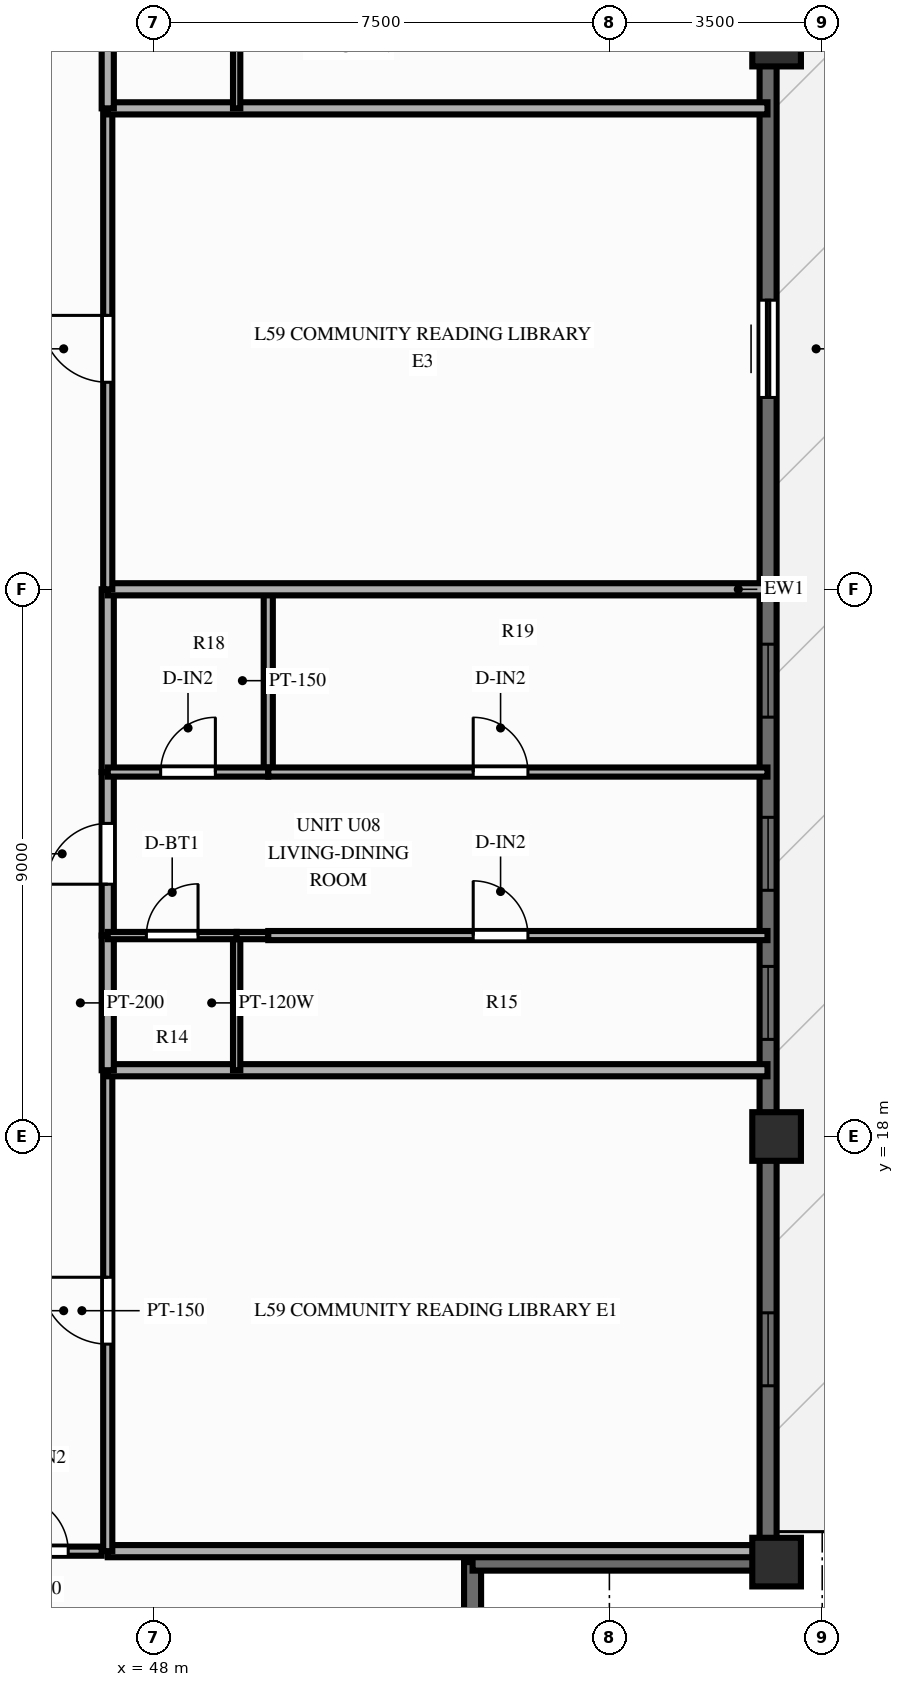
"""IFC4 building model, lengths in metres.
Left out: names, types, materials, properties, quantities, classifications, styles, units other than length and angle.
Written with IfcOpenShell. Run it as: python <this file> out.ifc"""

import sys

from ifc_helpers import new_model, si_unit, direction, frame, frame_2d, origin, origin_2d, place, context, subcontext, project, spatial, rectangle, extrude, source, transform, mapped, element, fill, save


model = new_model("IFC4")
c1 = context("Model", 3, precision=1e-05, world=origin(), true_north=direction((0.0, 1.0)))
c2 = subcontext(c1, "Body", "Model", "MODEL_VIEW")
j1 = project(units=[si_unit("LENGTHUNIT", "METRE"), si_unit("PLANEANGLEUNIT", "RADIAN")], contexts=[c1])
p1 = place(None, origin())
s1 = spatial("IfcSite", under=j1, at=p1, CompositionType="ELEMENT")
p2 = place(p1, origin())
s2 = spatial("IfcBuilding", under=s1, at=p2, CompositionType="ELEMENT")
p3 = place(p2, frame((0.0, 0.0, 189.7)))
s3 = spatial("IfcBuildingStorey", under=s2, at=p3, CompositionType="ELEMENT", Elevation=189.7)
m1 = source(origin(), c2, "Body", "SweptSolid", [
    extrude(rectangle(XDim=0.8, YDim=0.8, at=origin_2d()), origin(), (0.0, 0.0, 1.0), 3.0),
])
for number, where, z_axis, x_axis in (
    (1, (58.25, 11.0, 0.0), (0.0, 0.0, 1.0), (1.0, 0.0, 0.0)),
    (2, (58.25, 18.0, 0.0), (0.0, 0.0, 1.0), (1.0, 0.0, 0.0)),
    (3, (58.25, 36.0, 0.0), (0.0, 0.0, 1.0), (1.0, 0.0, 0.0)),
):
    element("IfcColumn", number, at=place(p3, frame(where, z_axis=z_axis, x_axis=x_axis)), inside=s3, PredefinedType="COLUMN", context=c2, shape_type="MappedRepresentation", body=[
        mapped(m1, transform((0.0, 0.0, 0.0), scale=1.0)),
    ])
p4 = place(p3, frame((58.11, 11.0, 0.0), z_axis=(0.0, 0.0, 1.0), x_axis=(0.0, 1.0, 0.0)))
e4 = element("IfcWall", 4, at=p4, inside=s3, PredefinedType="SOLIDWALL", context=c2, shape_type="SweptSolid", body=[
    extrude(rectangle(XDim=32.0, YDim=0.28, at=frame_2d((16.0, 0.0))), origin(), (0.0, 0.0, 1.0), 2.28),
])
p5 = place(p4, frame((2.9, 0.0, 0.25)))
e5 = element("IfcOpeningElement", 5, at=p5, cuts=e4, PredefinedType="OPENING", context=c2, shape_type="SweptSolid", body=[
    extrude(rectangle(XDim=1.2, YDim=1.5, at=frame_2d((0.6, 0.75))), frame((0.0, 0.152, 0.0), z_axis=(0.0, -1.0, 0.0), x_axis=(1.0, 0.0, 0.0)), (0.0, 0.0, 1.0), 0.304),
])
p6 = place(p4, frame((8.597, 0.0, 0.25)))
e6 = element("IfcOpeningElement", 6, at=p6, cuts=e4, PredefinedType="OPENING", context=c2, shape_type="SweptSolid", body=[
    extrude(rectangle(XDim=1.2, YDim=1.5, at=frame_2d((0.6, 0.75))), frame((0.0, 0.152, 0.0), z_axis=(0.0, -1.0, 0.0), x_axis=(1.0, 0.0, 0.0)), (0.0, 0.0, 1.0), 0.304),
])
p7 = place(p4, frame((11.05, 0.0, 0.25)))
e7 = element("IfcOpeningElement", 7, at=p7, cuts=e4, PredefinedType="OPENING", context=c2, shape_type="SweptSolid", body=[
    extrude(rectangle(XDim=1.2, YDim=1.5, at=frame_2d((0.6, 0.75))), frame((0.0, 0.152, 0.0), z_axis=(0.0, -1.0, 0.0), x_axis=(1.0, 0.0, 0.0)), (0.0, 0.0, 1.0), 0.304),
])
p8 = place(p4, frame((13.897, 0.0, 0.25)))
e8 = element("IfcOpeningElement", 8, at=p8, cuts=e4, PredefinedType="OPENING", context=c2, shape_type="SweptSolid", body=[
    extrude(rectangle(XDim=1.2, YDim=1.5, at=frame_2d((0.6, 0.75))), frame((0.0, 0.152, 0.0), z_axis=(0.0, -1.0, 0.0), x_axis=(1.0, 0.0, 0.0)), (0.0, 0.0, 1.0), 0.304),
])
p9 = place(p4, frame((20.755, 0.0, 0.0), z_axis=(0.0, 0.0, 1.0), x_axis=(-1.0, 0.0, 0.0)))
e9 = element("IfcOpeningElement", 9, at=p9, cuts=e4, PredefinedType="OPENING", context=c2, shape_type="SweptSolid", body=[
    extrude(rectangle(XDim=1.6, YDim=2.15, at=frame_2d((0.8, 1.075))), frame((0.0, 0.152, 0.0), z_axis=(0.0, -1.0, 0.0), x_axis=(1.0, 0.0, 0.0)), (0.0, 0.0, 1.0), 0.304),
])
p10 = place(p4, frame((26.967, 0.0, 0.25)))
e10 = element("IfcOpeningElement", 10, at=p10, cuts=e4, PredefinedType="OPENING", context=c2, shape_type="SweptSolid", body=[
    extrude(rectangle(XDim=1.2, YDim=1.5, at=frame_2d((0.6, 0.75))), frame((0.0, 0.152, 0.0), z_axis=(0.0, -1.0, 0.0), x_axis=(1.0, 0.0, 0.0)), (0.0, 0.0, 1.0), 0.304),
])
p11 = place(p4, frame((29.687, 0.0, 0.25)))
e11 = element("IfcOpeningElement", 11, at=p11, cuts=e4, PredefinedType="OPENING", context=c2, shape_type="SweptSolid", body=[
    extrude(rectangle(XDim=1.2, YDim=1.5, at=frame_2d((0.6, 0.75))), frame((0.0, 0.152, 0.0), z_axis=(0.0, -1.0, 0.0), x_axis=(1.0, 0.0, 0.0)), (0.0, 0.0, 1.0), 0.304),
])
for number, where, z_axis, x_axis in (
    (12, (53.25, 6.08, 0.0), (0.0, 0.0, 1.0), (0.0, 1.0, 0.0)),
    (13, (53.25, 11.0, 0.0), (0.0, 0.0, 1.0), (1.0, 0.0, 0.0)),
):
    element("IfcWall", number, at=place(p3, frame(where, z_axis=z_axis, x_axis=x_axis)), inside=s3, PredefinedType="SOLIDWALL", context=c2, shape_type="SweptSolid", body=[
        extrude(rectangle(XDim=4.92, YDim=0.28, at=frame_2d((2.46, 0.0))), origin(), (0.0, 0.0, 1.0), 2.28),
    ])
p12 = place(p3, frame((44.82, 11.18, 0.0), z_axis=(0.0, 0.0, 1.0), x_axis=(1.0, 0.0, 0.0)))
e14 = element("IfcWall", 14, at=p12, inside=s3, PredefinedType="PARTITIONING", context=c2, shape_type="SweptSolid", body=[
    extrude(rectangle(XDim=2.33, YDim=0.15, at=frame_2d((1.165, 0.0))), origin(), (0.0, 0.0, 1.0), 2.79),
])
p13 = place(p12, frame((0.88, 0.0, 0.0)))
e15 = element("IfcOpeningElement", 15, at=p13, cuts=e14, PredefinedType="OPENING", context=c2, shape_type="SweptSolid", body=[
    extrude(rectangle(XDim=0.9, YDim=2.1, at=frame_2d((0.45, 1.05))), frame((0.0, 0.087, 0.0), z_axis=(0.0, -1.0, 0.0), x_axis=(1.0, 0.0, 0.0)), (0.0, 0.0, 1.0), 0.174),
])
p14 = place(p3, frame((47.25, 11.18, 0.0), z_axis=(0.0, 0.0, 1.0), x_axis=(1.0, 0.0, 0.0)))
e16 = element("IfcWall", 16, at=p14, inside=s3, PredefinedType="PARTITIONING", context=c2, shape_type="SweptSolid", body=[
    extrude(rectangle(XDim=10.85, YDim=0.2, at=frame_2d((5.425, 0.0))), origin(), (0.0, 0.0, 1.0), 2.79),
])
p15 = place(p3, frame((47.25, 11.18, 0.0), z_axis=(0.0, 0.0, 1.0), x_axis=(0.0, 1.0, 0.0)))
e17 = element("IfcWall", 17, at=p15, inside=s3, PredefinedType="PARTITIONING", context=c2, shape_type="SweptSolid", body=[
    extrude(rectangle(XDim=7.91, YDim=0.15, at=frame_2d((3.955, 0.0))), origin(), (0.0, 0.0, 1.0), 2.79),
])
p16 = place(p15, frame((3.405, 0.0, 0.0)))
e18 = element("IfcOpeningElement", 18, at=p16, cuts=e17, PredefinedType="OPENING", context=c2, shape_type="SweptSolid", body=[
    extrude(rectangle(XDim=1.1, YDim=2.15, at=frame_2d((0.55, 1.075))), frame((0.0, 0.087, 0.0), z_axis=(0.0, -1.0, 0.0), x_axis=(1.0, 0.0, 0.0)), (0.0, 0.0, 1.0), 0.174),
])
p17 = place(p3, frame((47.25, 19.09, 0.0), z_axis=(0.0, 0.0, 1.0), x_axis=(1.0, 0.0, 0.0)))
e19 = element("IfcWall", 19, at=p17, inside=s3, PredefinedType="PARTITIONING", context=c2, shape_type="SweptSolid", body=[
    extrude(rectangle(XDim=10.85, YDim=0.2, at=frame_2d((5.425, 0.0))), origin(), (0.0, 0.0, 1.0), 2.79),
])
p18 = place(p3, frame((47.25, 19.09, 0.0), z_axis=(0.0, 0.0, 1.0), x_axis=(0.0, 1.0, 0.0)))
e20 = element("IfcWall", 20, at=p18, inside=s3, PredefinedType="PARTITIONING", context=c2, shape_type="SweptSolid", body=[
    extrude(rectangle(XDim=2.215, YDim=0.2, at=frame_2d((1.107, 0.0))), origin(), (0.0, 0.0, 1.0), 2.79),
])
p19 = place(p3, frame((47.25, 21.305, 0.0), z_axis=(0.0, 0.0, 1.0), x_axis=(0.0, 1.0, 0.0)))
e21 = element("IfcWall", 21, at=p19, inside=s3, PredefinedType="PARTITIONING", context=c2, shape_type="SweptSolid", body=[
    extrude(rectangle(XDim=2.689, YDim=0.2, at=frame_2d((1.345, 0.0))), origin(), (0.0, 0.0, 1.0), 2.79),
])
p20 = place(p19, frame((0.845, 0.0, 0.0)))
e22 = element("IfcOpeningElement", 22, at=p20, cuts=e21, PredefinedType="OPENING", context=c2, shape_type="SweptSolid", body=[
    extrude(rectangle(XDim=1.0, YDim=2.15, at=frame_2d((0.5, 1.075))), frame((0.0, 0.112, 0.0), z_axis=(0.0, -1.0, 0.0), x_axis=(1.0, 0.0, 0.0)), (0.0, 0.0, 1.0), 0.224),
])
p21 = place(p3, frame((47.25, 23.994, 0.0), z_axis=(0.0, 0.0, 1.0), x_axis=(0.0, 1.0, 0.0)))
e23 = element("IfcWall", 23, at=p21, inside=s3, PredefinedType="PARTITIONING", context=c2, shape_type="SweptSolid", body=[
    extrude(rectangle(XDim=3.006, YDim=0.2, at=frame_2d((1.503, 0.0))), origin(), (0.0, 0.0, 1.0), 2.79),
])
p22 = place(p3, frame((49.37, 19.09, 0.0), z_axis=(0.0, 0.0, 1.0), x_axis=(0.0, 1.0, 0.0)))
e24 = element("IfcWall", 24, at=p22, inside=s3, PredefinedType="PARTITIONING", context=c2, shape_type="SweptSolid", body=[
    extrude(rectangle(XDim=2.215, YDim=0.12, at=frame_2d((1.107, 0.0))), origin(), (0.0, 0.0, 1.0), 2.79),
])
p23 = place(p3, frame((49.89, 23.994, 0.0), z_axis=(0.0, 0.0, 1.0), x_axis=(0.0, 1.0, 0.0)))
e25 = element("IfcWall", 25, at=p23, inside=s3, PredefinedType="PARTITIONING", context=c2, shape_type="SweptSolid", body=[
    extrude(rectangle(XDim=3.006, YDim=0.15, at=frame_2d((1.503, 0.0))), origin(), (0.0, 0.0, 1.0), 2.79),
])
p24 = place(p3, frame((47.25, 21.305, 0.0), z_axis=(0.0, 0.0, 1.0), x_axis=(1.0, 0.0, 0.0)))
e26 = element("IfcWall", 26, at=p24, inside=s3, PredefinedType="PARTITIONING", context=c2, shape_type="SweptSolid", body=[
    extrude(rectangle(XDim=2.12, YDim=0.12, at=frame_2d((1.06, 0.0))), origin(), (0.0, 0.0, 1.0), 2.79),
])
p25 = place(p24, frame((0.635, 0.0, 0.0)))
e27 = element("IfcOpeningElement", 27, at=p25, cuts=e26, PredefinedType="OPENING", context=c2, shape_type="SweptSolid", body=[
    extrude(rectangle(XDim=0.85, YDim=2.05, at=frame_2d((0.425, 1.025))), frame((0.0, 0.072, 0.0), z_axis=(0.0, -1.0, 0.0), x_axis=(1.0, 0.0, 0.0)), (0.0, 0.0, 1.0), 0.144),
])
p26 = place(p3, frame((49.37, 21.305, 0.0), z_axis=(0.0, 0.0, 1.0), x_axis=(1.0, 0.0, 0.0)))
e28 = element("IfcWall", 28, at=p26, inside=s3, PredefinedType="PARTITIONING", context=c2, shape_type="SweptSolid", body=[
    extrude(rectangle(XDim=0.52, YDim=0.12, at=frame_2d((0.26, 0.0))), origin(), (0.0, 0.0, 1.0), 2.79),
])
p27 = place(p3, frame((49.89, 21.305, 0.0), z_axis=(0.0, 0.0, 1.0), x_axis=(1.0, 0.0, 0.0)))
e29 = element("IfcWall", 29, at=p27, inside=s3, PredefinedType="PARTITIONING", context=c2, shape_type="SweptSolid", body=[
    extrude(rectangle(XDim=8.21, YDim=0.15, at=frame_2d((4.105, 0.0))), origin(), (0.0, 0.0, 1.0), 2.79),
])
p28 = place(p27, frame((3.37, 0.0, 0.0)))
e30 = element("IfcOpeningElement", 30, at=p28, cuts=e29, PredefinedType="OPENING", context=c2, shape_type="SweptSolid", body=[
    extrude(rectangle(XDim=0.9, YDim=2.1, at=frame_2d((0.45, 1.05))), frame((0.0, 0.087, 0.0), z_axis=(0.0, -1.0, 0.0), x_axis=(1.0, 0.0, 0.0)), (0.0, 0.0, 1.0), 0.174),
])
p29 = place(p3, frame((47.25, 23.994, 0.0), z_axis=(0.0, 0.0, 1.0), x_axis=(1.0, 0.0, 0.0)))
e31 = element("IfcWall", 31, at=p29, inside=s3, PredefinedType="PARTITIONING", context=c2, shape_type="SweptSolid", body=[
    extrude(rectangle(XDim=2.64, YDim=0.15, at=frame_2d((1.32, 0.0))), origin(), (0.0, 0.0, 1.0), 2.79),
])
p30 = place(p29, frame((0.87, 0.0, 0.0)))
e32 = element("IfcOpeningElement", 32, at=p30, cuts=e31, PredefinedType="OPENING", context=c2, shape_type="SweptSolid", body=[
    extrude(rectangle(XDim=0.9, YDim=2.1, at=frame_2d((0.45, 1.05))), frame((0.0, 0.087, 0.0), z_axis=(0.0, -1.0, 0.0), x_axis=(1.0, 0.0, 0.0)), (0.0, 0.0, 1.0), 0.174),
])
p31 = place(p3, frame((49.89, 23.994, 0.0), z_axis=(0.0, 0.0, 1.0), x_axis=(1.0, 0.0, 0.0)))
e33 = element("IfcWall", 33, at=p31, inside=s3, PredefinedType="PARTITIONING", context=c2, shape_type="SweptSolid", body=[
    extrude(rectangle(XDim=8.21, YDim=0.15, at=frame_2d((4.105, 0.0))), origin(), (0.0, 0.0, 1.0), 2.79),
])
p32 = place(p31, frame((3.37, 0.0, 0.0)))
e34 = element("IfcOpeningElement", 34, at=p32, cuts=e33, PredefinedType="OPENING", context=c2, shape_type="SweptSolid", body=[
    extrude(rectangle(XDim=0.9, YDim=2.1, at=frame_2d((0.45, 1.05))), frame((0.0, 0.087, 0.0), z_axis=(0.0, -1.0, 0.0), x_axis=(1.0, 0.0, 0.0)), (0.0, 0.0, 1.0), 0.174),
])
p33 = place(p3, frame((47.25, 27.0, 0.0), z_axis=(0.0, 0.0, 1.0), x_axis=(1.0, 0.0, 0.0)))
e35 = element("IfcWall", 35, at=p33, inside=s3, PredefinedType="PARTITIONING", context=c2, shape_type="SweptSolid", body=[
    extrude(rectangle(XDim=10.85, YDim=0.2, at=frame_2d((5.425, 0.0))), origin(), (0.0, 0.0, 1.0), 2.79),
])
p34 = place(p3, frame((47.25, 27.0, 0.0), z_axis=(0.0, 0.0, 1.0), x_axis=(0.0, 1.0, 0.0)))
e36 = element("IfcWall", 36, at=p34, inside=s3, PredefinedType="PARTITIONING", context=c2, shape_type="SweptSolid", body=[
    extrude(rectangle(XDim=7.91, YDim=0.15, at=frame_2d((3.955, 0.0))), origin(), (0.0, 0.0, 1.0), 2.79),
])
p35 = place(p34, frame((3.405, 0.0, 0.0)))
e37 = element("IfcOpeningElement", 37, at=p35, cuts=e36, PredefinedType="OPENING", context=c2, shape_type="SweptSolid", body=[
    extrude(rectangle(XDim=1.1, YDim=2.15, at=frame_2d((0.55, 1.075))), frame((0.0, 0.087, 0.0), z_axis=(0.0, -1.0, 0.0), x_axis=(1.0, 0.0, 0.0)), (0.0, 0.0, 1.0), 0.174),
])
p36 = place(p3, frame((47.25, 34.91, 0.0), z_axis=(0.0, 0.0, 1.0), x_axis=(1.0, 0.0, 0.0)))
e38 = element("IfcWall", 38, at=p36, inside=s3, PredefinedType="PARTITIONING", context=c2, shape_type="SweptSolid", body=[
    extrude(rectangle(XDim=10.85, YDim=0.2, at=frame_2d((5.425, 0.0))), origin(), (0.0, 0.0, 1.0), 2.79),
])
p37 = place(p3, frame((47.25, 34.91, 0.0), z_axis=(0.0, 0.0, 1.0), x_axis=(0.0, 1.0, 0.0)))
e39 = element("IfcWall", 39, at=p37, inside=s3, PredefinedType="PARTITIONING", context=c2, shape_type="SweptSolid", body=[
    extrude(rectangle(XDim=2.41, YDim=0.2, at=frame_2d((1.205, 0.0))), origin(), (0.0, 0.0, 1.0), 2.79),
])
p38 = place(p3, frame((49.37, 34.91, 0.0), z_axis=(0.0, 0.0, 1.0), x_axis=(0.0, 1.0, 0.0)))
e40 = element("IfcWall", 40, at=p38, inside=s3, PredefinedType="PARTITIONING", context=c2, shape_type="SweptSolid", body=[
    extrude(rectangle(XDim=2.41, YDim=0.12, at=frame_2d((1.205, 0.0))), origin(), (0.0, 0.0, 1.0), 2.79),
])
m2 = source(origin(), c2, "Body", "SweptSolid", [
    extrude(rectangle(XDim=1.2, YDim=1.5, at=frame_2d((0.6, 0.75))), frame((0.0, 0.03, 0.0), z_axis=(0.0, -1.0, 0.0), x_axis=(1.0, 0.0, 0.0)), (0.0, 0.0, 1.0), 0.06),
])
p39 = place(p5, origin())
e41 = element("IfcWindow", 41, at=p39, inside=s3, PartitioningType="SINGLE_PANEL", PredefinedType="WINDOW", context=c2, shape_type="MappedRepresentation", body=[
    mapped(m2, transform((0.0, 0.0, 0.0), scale=1.0)),
])
fill(e5, e41)
p40 = place(p6, origin())
e42 = element("IfcWindow", 42, at=p40, inside=s3, PartitioningType="SINGLE_PANEL", PredefinedType="WINDOW", context=c2, shape_type="MappedRepresentation", body=[
    mapped(m2, transform((0.0, 0.0, 0.0), scale=1.0)),
])
fill(e6, e42)
p41 = place(p7, origin())
e43 = element("IfcWindow", 43, at=p41, inside=s3, PartitioningType="SINGLE_PANEL", PredefinedType="WINDOW", context=c2, shape_type="MappedRepresentation", body=[
    mapped(m2, transform((0.0, 0.0, 0.0), scale=1.0)),
])
fill(e7, e43)
p42 = place(p8, origin())
e44 = element("IfcWindow", 44, at=p42, inside=s3, PartitioningType="SINGLE_PANEL", PredefinedType="WINDOW", context=c2, shape_type="MappedRepresentation", body=[
    mapped(m2, transform((0.0, 0.0, 0.0), scale=1.0)),
])
fill(e8, e44)
m3 = source(origin(), c2, "Body", "SweptSolid", [
    extrude(rectangle(XDim=1.6, YDim=2.15, at=frame_2d((0.8, 1.075))), frame((0.0, 0.025, 0.0), z_axis=(0.0, -1.0, 0.0), x_axis=(1.0, 0.0, 0.0)), (0.0, 0.0, 1.0), 0.05),
])
p43 = place(p9, origin())
e45 = element("IfcDoor", 45, at=p43, inside=s3, OperationType="SLIDING_TO_LEFT", PredefinedType="DOOR", context=c2, shape_type="MappedRepresentation", body=[
    mapped(m3, transform((0.0, 0.0, 0.0), scale=1.0)),
])
fill(e9, e45)
m4 = source(origin(), c2, "Body", "SweptSolid", [
    extrude(rectangle(XDim=0.9, YDim=2.1, at=frame_2d((0.45, 1.05))), frame((0.0, 0.025, 0.0), z_axis=(0.0, -1.0, 0.0), x_axis=(1.0, 0.0, 0.0)), (0.0, 0.0, 1.0), 0.05),
])
p44 = place(p13, origin())
e46 = element("IfcDoor", 46, at=p44, inside=s3, OperationType="SINGLE_SWING_LEFT", PredefinedType="DOOR", context=c2, shape_type="MappedRepresentation", body=[
    mapped(m4, transform((0.0, 0.0, 0.0), scale=1.0)),
])
fill(e15, e46)
m5 = source(origin(), c2, "Body", "SweptSolid", [
    extrude(rectangle(XDim=1.1, YDim=2.15, at=frame_2d((0.55, 1.075))), frame((0.0, 0.025, 0.0), z_axis=(0.0, -1.0, 0.0), x_axis=(1.0, 0.0, 0.0)), (0.0, 0.0, 1.0), 0.05),
])
p45 = place(p16, origin())
e47 = element("IfcDoor", 47, at=p45, inside=s3, OperationType="SINGLE_SWING_RIGHT", PredefinedType="DOOR", context=c2, shape_type="MappedRepresentation", body=[
    mapped(m5, transform((0.0, 0.0, 0.0), scale=1.0)),
])
fill(e18, e47)
m6 = source(origin(), c2, "Body", "SweptSolid", [
    extrude(rectangle(XDim=1.0, YDim=2.15, at=frame_2d((0.5, 1.075))), frame((0.0, 0.025, 0.0), z_axis=(0.0, -1.0, 0.0), x_axis=(1.0, 0.0, 0.0)), (0.0, 0.0, 1.0), 0.05),
])
p46 = place(p20, origin())
e48 = element("IfcDoor", 48, at=p46, inside=s3, OperationType="SINGLE_SWING_LEFT", PredefinedType="DOOR", context=c2, shape_type="MappedRepresentation", body=[
    mapped(m6, transform((0.0, 0.0, 0.0), scale=1.0)),
])
fill(e22, e48)
m7 = source(origin(), c2, "Body", "SweptSolid", [
    extrude(rectangle(XDim=0.85, YDim=2.05, at=frame_2d((0.425, 1.025))), frame((0.0, 0.025, 0.0), z_axis=(0.0, -1.0, 0.0), x_axis=(1.0, 0.0, 0.0)), (0.0, 0.0, 1.0), 0.05),
])
p47 = place(p25, origin())
e49 = element("IfcDoor", 49, at=p47, inside=s3, OperationType="SINGLE_SWING_RIGHT", PredefinedType="DOOR", context=c2, shape_type="MappedRepresentation", body=[
    mapped(m7, transform((0.0, 0.0, 0.0), scale=1.0)),
])
fill(e27, e49)
p48 = place(p28, origin())
e50 = element("IfcDoor", 50, at=p48, inside=s3, OperationType="SINGLE_SWING_LEFT", PredefinedType="DOOR", context=c2, shape_type="MappedRepresentation", body=[
    mapped(m4, transform((0.0, 0.0, 0.0), scale=1.0)),
])
fill(e30, e50)
p49 = place(p30, origin())
e51 = element("IfcDoor", 51, at=p49, inside=s3, OperationType="SINGLE_SWING_RIGHT", PredefinedType="DOOR", context=c2, shape_type="MappedRepresentation", body=[
    mapped(m4, transform((0.0, 0.0, 0.0), scale=1.0)),
])
fill(e32, e51)
p50 = place(p32, origin())
e52 = element("IfcDoor", 52, at=p50, inside=s3, OperationType="SINGLE_SWING_LEFT", PredefinedType="DOOR", context=c2, shape_type="MappedRepresentation", body=[
    mapped(m4, transform((0.0, 0.0, 0.0), scale=1.0)),
])
fill(e34, e52)
p51 = place(p35, origin())
e53 = element("IfcDoor", 53, at=p51, inside=s3, OperationType="SINGLE_SWING_RIGHT", PredefinedType="DOOR", context=c2, shape_type="MappedRepresentation", body=[
    mapped(m5, transform((0.0, 0.0, 0.0), scale=1.0)),
])
fill(e37, e53)
save(model, sys.argv[1])
